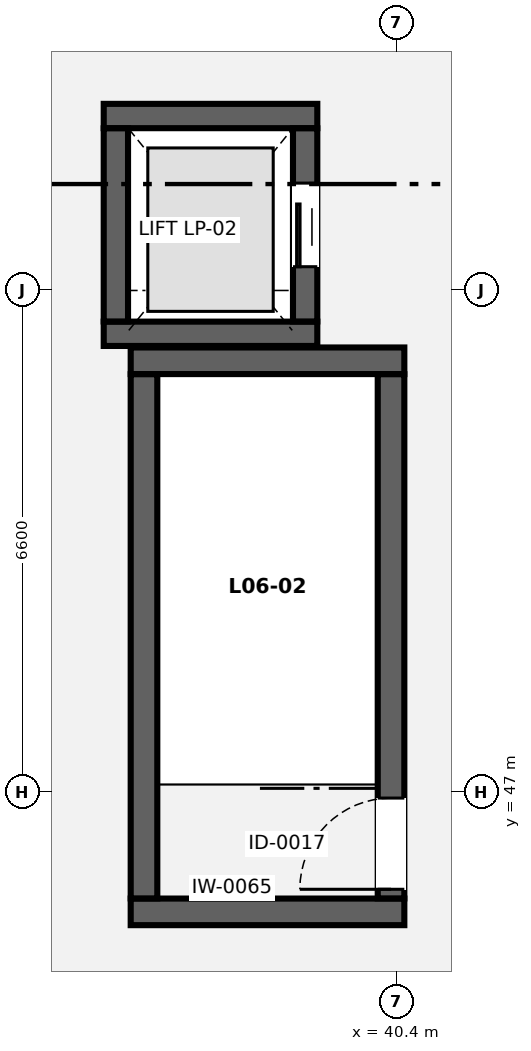
"""IFC4 building model, lengths in metres.
Left out: names, types, materials, properties, quantities, classifications, styles, units other than length and angle.
Written with IfcOpenShell. Run it as: python <this file> out.ifc"""

import sys

from ifc_helpers import new_model, si_unit, direction, frame, frame_2d, origin, place, context, subcontext, project, spatial, rectangle, extrude, element, fill, save


model = new_model("IFC4")
c1 = context("Model", 3, precision=1e-05, world=origin(), true_north=direction((0.0, 1.0)))
c2 = subcontext(c1, "Body", "Model", "MODEL_VIEW")
j1 = project(units=[si_unit("LENGTHUNIT", "METRE"), si_unit("PLANEANGLEUNIT", "RADIAN")], contexts=[c1])
p1 = place(None, origin())
s1 = spatial("IfcSite", under=j1, at=p1, CompositionType="ELEMENT")
p2 = place(p1, origin())
s2 = spatial("IfcBuilding", under=s1, at=p2, CompositionType="ELEMENT")
p3 = place(p2, frame((0.0, 0.0, 25.9)))
s3 = spatial("IfcBuildingStorey", under=s2, at=p3, CompositionType="ELEMENT", Elevation=25.9)
for number, where, z_axis, x_axis in (
    (1, (36.9, 45.425, 0.0), (0.0, 0.0, 1.0), (1.0, 0.0, 0.0)),
    (2, (36.9, 52.675, 0.0), (0.0, 0.0, 1.0), (1.0, 0.0, 0.0)),
):
    element("IfcWall", number, at=place(p3, frame(where, z_axis=z_axis, x_axis=x_axis)), inside=s3, PredefinedType="SHEAR", context=c2, shape_type="SweptSolid", body=[
        extrude(rectangle(XDim=3.6, YDim=0.35, at=frame_2d((1.8, 0.0))), origin(), (0.0, 0.0, 1.0), 4.0),
    ])
p4 = place(p3, frame((37.075, 45.602, 0.0), z_axis=(0.0, 0.0, 1.0), x_axis=(0.0, 1.0, 0.0)))
e3 = element("IfcWall", 3, at=p4, inside=s3, PredefinedType="SHEAR", context=c2, shape_type="SweptSolid", body=[
    extrude(rectangle(XDim=6.896, YDim=0.35, at=frame_2d((3.448, 0.0))), origin(), (0.0, 0.0, 1.0), 4.0),
])
p5 = place(p3, frame((40.325, 45.602, 0.0), z_axis=(0.0, 0.0, 1.0), x_axis=(0.0, 1.0, 0.0)))
e4 = element("IfcWall", 4, at=p5, inside=s3, PredefinedType="SHEAR", context=c2, shape_type="SweptSolid", body=[
    extrude(rectangle(XDim=6.896, YDim=0.35, at=frame_2d((3.448, 0.0))), origin(), (0.0, 0.0, 1.0), 4.0),
])
p6 = place(p5, frame((0.12, 0.0, 0.0)))
e5 = element("IfcOpeningElement", 5, at=p6, cuts=e4, PredefinedType="OPENING", context=c2, shape_type="SweptSolid", body=[
    extrude(rectangle(XDim=1.2, YDim=2.15, at=frame_2d((0.6, 1.075))), frame((0.0, 0.185, 0.0), z_axis=(0.0, -1.0, 0.0), x_axis=(1.0, 0.0, 0.0)), (0.0, 0.0, 1.0), 0.37),
])
for number, where, z_axis, x_axis in (
    (6, (36.545, 53.03, 0.0), (0.0, 0.0, 1.0), (1.0, 0.0, 0.0)),
    (7, (36.545, 55.895, 0.0), (0.0, 0.0, 1.0), (1.0, 0.0, 0.0)),
):
    element("IfcWall", number, at=place(p3, frame(where, z_axis=z_axis, x_axis=x_axis)), inside=s3, PredefinedType="SHEAR", context=c2, shape_type="SweptSolid", body=[
        extrude(rectangle(XDim=2.81, YDim=0.32, at=frame_2d((1.405, 0.0))), origin(), (0.0, 0.0, 1.0), 4.0),
    ])
p7 = place(p3, frame((36.705, 53.192, 0.0), z_axis=(0.0, 0.0, 1.0), x_axis=(0.0, 1.0, 0.0)))
e8 = element("IfcWall", 8, at=p7, inside=s3, PredefinedType="SHEAR", context=c2, shape_type="SweptSolid", body=[
    extrude(rectangle(XDim=2.541, YDim=0.32, at=frame_2d((1.271, 0.0))), origin(), (0.0, 0.0, 1.0), 4.0),
])
p8 = place(p3, frame((39.195, 53.192, 0.0), z_axis=(0.0, 0.0, 1.0), x_axis=(0.0, 1.0, 0.0)))
e9 = element("IfcWall", 9, at=p8, inside=s3, PredefinedType="SHEAR", context=c2, shape_type="SweptSolid", body=[
    extrude(rectangle(XDim=2.541, YDim=0.32, at=frame_2d((1.271, 0.0))), origin(), (0.0, 0.0, 1.0), 4.0),
])
p9 = place(p8, frame((0.72, 0.0, 0.0)))
e10 = element("IfcOpeningElement", 10, at=p9, cuts=e9, PredefinedType="OPENING", context=c2, shape_type="SweptSolid", body=[
    extrude(rectangle(XDim=1.1, YDim=2.15, at=frame_2d((0.55, 1.075))), frame((0.0, 0.17, 0.0), z_axis=(0.0, -1.0, 0.0), x_axis=(1.0, 0.0, 0.0)), (0.0, 0.0, 1.0), 0.34),
])
p10 = place(p6, origin())
e11 = element("IfcDoor", 11, at=p10, inside=s3, OperationType="SINGLE_SWING_LEFT", PredefinedType="DOOR", context=c2, shape_type="SweptSolid", body=[
    extrude(rectangle(XDim=1.2, YDim=2.15, at=frame_2d((0.6, 1.075))), frame((0.0, 0.025, 0.0), z_axis=(0.0, -1.0, 0.0), x_axis=(1.0, 0.0, 0.0)), (0.0, 0.0, 1.0), 0.05),
])
fill(e5, e11)
p11 = place(p9, origin())
e12 = element("IfcDoor", 12, at=p11, inside=s3, OperationType="SLIDING_TO_LEFT", PredefinedType="DOOR", context=c2, shape_type="SweptSolid", body=[
    extrude(rectangle(XDim=1.1, YDim=2.15, at=frame_2d((0.55, 1.075))), frame((0.0, 0.025, 0.0), z_axis=(0.0, -1.0, 0.0), x_axis=(1.0, 0.0, 0.0)), (0.0, 0.0, 1.0), 0.05),
])
fill(e10, e12)
save(model, sys.argv[1])
